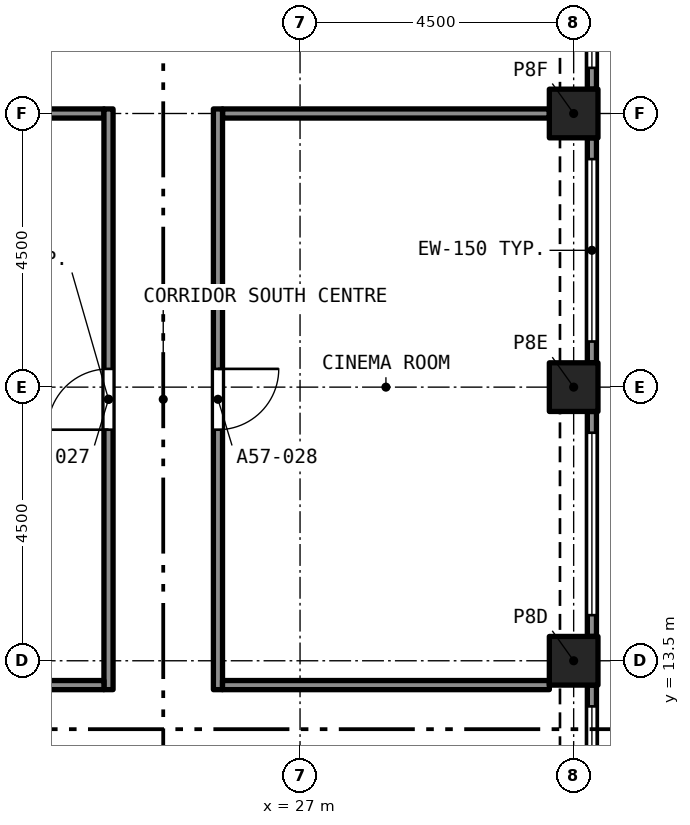
"""IFC4 building model, lengths in metres.
Left out: names, types, materials, properties, quantities, classifications, styles, units other than length and angle.
Written with IfcOpenShell. Run it as: python <this file> out.ifc"""

import sys

from ifc_helpers import new_model, si_unit, direction, frame, frame_2d, origin, origin_2d, place, context, subcontext, project, spatial, rectangle, extrude, element, fill, save


model = new_model("IFC4")
c1 = context("Model", 3, precision=1e-05, world=origin(), true_north=direction((0.0, 1.0)))
c2 = subcontext(c1, "Body", "Model", "MODEL_VIEW")
j1 = project(units=[si_unit("LENGTHUNIT", "METRE"), si_unit("PLANEANGLEUNIT", "RADIAN")], contexts=[c1])
p1 = place(None, origin())
s1 = spatial("IfcSite", under=j1, at=p1, CompositionType="ELEMENT")
p2 = place(p1, origin())
s2 = spatial("IfcBuilding", under=s1, at=p2, CompositionType="ELEMENT")
p3 = place(p2, frame((0.0, 0.0, 206.895)))
s3 = spatial("IfcBuildingStorey", under=s2, at=p3, CompositionType="ELEMENT", Elevation=206.895)
for number, where, z_axis, x_axis in (
    (1, (31.5, 13.5, 0.0), (0.0, 0.0, 1.0), (1.0, 0.0, 0.0)),
    (2, (31.5, 18.0, 0.0), (0.0, 0.0, 1.0), (1.0, 0.0, 0.0)),
    (3, (31.5, 22.5, 0.0), (0.0, 0.0, 1.0), (1.0, 0.0, 0.0)),
):
    element("IfcColumn", number, at=place(p3, frame(where, z_axis=z_axis, x_axis=x_axis)), inside=s3, PredefinedType="COLUMN", context=c2, shape_type="SweptSolid", body=[
        extrude(rectangle(XDim=0.8, YDim=0.8, at=origin_2d()), origin(), (0.0, 0.0, 1.0), 3.2),
    ])
p4 = place(p3, frame((31.8, 13.1, 0.0), z_axis=(0.0, 0.0, 1.0), x_axis=(0.0, -1.0, 0.0)))
e4 = element("IfcWall", 4, at=p4, inside=s3, PredefinedType="SOLIDWALL", context=c2, shape_type="SweptSolid", body=[
    extrude(rectangle(XDim=3.7, YDim=0.15, at=frame_2d((1.85, 0.0))), origin(), (0.0, 0.0, 1.0), 3.2),
])
p5 = place(p4, frame((0.35, 0.0, 0.45)))
e5 = element("IfcOpeningElement", 5, at=p5, cuts=e4, PredefinedType="OPENING", context=c2, shape_type="SweptSolid", body=[
    extrude(rectangle(XDim=3.0, YDim=1.95, at=frame_2d((1.5, 0.975))), frame((0.0, 0.085, 0.0), z_axis=(0.0, -1.0, 0.0), x_axis=(1.0, 0.0, 0.0)), (0.0, 0.0, 1.0), 0.17),
])
p6 = place(p3, frame((31.8, 17.6, 0.0), z_axis=(0.0, 0.0, 1.0), x_axis=(0.0, -1.0, 0.0)))
e6 = element("IfcWall", 6, at=p6, inside=s3, PredefinedType="SOLIDWALL", context=c2, shape_type="SweptSolid", body=[
    extrude(rectangle(XDim=3.7, YDim=0.15, at=frame_2d((1.85, 0.0))), origin(), (0.0, 0.0, 1.0), 3.2),
])
p7 = place(p6, frame((0.35, 0.0, 0.45)))
e7 = element("IfcOpeningElement", 7, at=p7, cuts=e6, PredefinedType="OPENING", context=c2, shape_type="SweptSolid", body=[
    extrude(rectangle(XDim=3.0, YDim=1.95, at=frame_2d((1.5, 0.975))), frame((0.0, 0.085, 0.0), z_axis=(0.0, -1.0, 0.0), x_axis=(1.0, 0.0, 0.0)), (0.0, 0.0, 1.0), 0.17),
])
p8 = place(p3, frame((31.8, 22.1, 0.0), z_axis=(0.0, 0.0, 1.0), x_axis=(0.0, -1.0, 0.0)))
e8 = element("IfcWall", 8, at=p8, inside=s3, PredefinedType="SOLIDWALL", context=c2, shape_type="SweptSolid", body=[
    extrude(rectangle(XDim=3.7, YDim=0.15, at=frame_2d((1.85, 0.0))), origin(), (0.0, 0.0, 1.0), 3.2),
])
p9 = place(p8, frame((0.35, 0.0, 0.45)))
e9 = element("IfcOpeningElement", 9, at=p9, cuts=e8, PredefinedType="OPENING", context=c2, shape_type="SweptSolid", body=[
    extrude(rectangle(XDim=3.0, YDim=1.95, at=frame_2d((1.5, 0.975))), frame((0.0, 0.085, 0.0), z_axis=(0.0, -1.0, 0.0), x_axis=(1.0, 0.0, 0.0)), (0.0, 0.0, 1.0), 0.17),
])
p10 = place(p3, frame((31.8, 26.6, 0.0), z_axis=(0.0, 0.0, 1.0), x_axis=(0.0, -1.0, 0.0)))
e10 = element("IfcWall", 10, at=p10, inside=s3, PredefinedType="SOLIDWALL", context=c2, shape_type="SweptSolid", body=[
    extrude(rectangle(XDim=3.7, YDim=0.15, at=frame_2d((1.85, 0.0))), origin(), (0.0, 0.0, 1.0), 3.2),
])
p11 = place(p10, frame((0.35, 0.0, 0.45)))
e11 = element("IfcOpeningElement", 11, at=p11, cuts=e10, PredefinedType="OPENING", context=c2, shape_type="SweptSolid", body=[
    extrude(rectangle(XDim=3.0, YDim=1.95, at=frame_2d((1.5, 0.975))), frame((0.0, 0.085, 0.0), z_axis=(0.0, -1.0, 0.0), x_axis=(1.0, 0.0, 0.0)), (0.0, 0.0, 1.0), 0.17),
])
for number, where, z_axis, x_axis in (
    (12, (18.4, 22.5, 0.0), (0.0, 0.0, 1.0), (1.0, 0.0, 0.0)),
    (13, (25.725, 22.5, 0.0), (0.0, 0.0, 1.0), (1.0, 0.0, 0.0)),
):
    element("IfcWall", number, at=place(p3, frame(where, z_axis=z_axis, x_axis=x_axis)), inside=s3, PredefinedType="PARTITIONING", context=c2, shape_type="SweptSolid", body=[
        extrude(rectangle(XDim=5.375, YDim=0.15, at=frame_2d((2.688, 0.0))), origin(), (0.0, 0.0, 1.0), 2.75),
    ])
p12 = place(p3, frame((23.85, 13.025, 0.0), z_axis=(0.0, 0.0, 1.0), x_axis=(0.0, 1.0, 0.0)))
e14 = element("IfcWall", 14, at=p12, inside=s3, PredefinedType="PARTITIONING", context=c2, shape_type="SweptSolid", body=[
    extrude(rectangle(XDim=9.55, YDim=0.15, at=frame_2d((4.775, 0.0))), origin(), (0.0, 0.0, 1.0), 2.75),
])
p13 = place(p12, frame((4.275, 0.0, 0.0)))
e15 = element("IfcOpeningElement", 15, at=p13, cuts=e14, PredefinedType="OPENING", context=c2, shape_type="SweptSolid", body=[
    extrude(rectangle(XDim=1.0, YDim=2.1, at=frame_2d((0.5, 1.05))), frame((0.0, 0.085, 0.0), z_axis=(0.0, -1.0, 0.0), x_axis=(1.0, 0.0, 0.0)), (0.0, 0.0, 1.0), 0.17),
])
p14 = place(p3, frame((25.65, 22.575, 0.0), z_axis=(0.0, 0.0, 1.0), x_axis=(0.0, -1.0, 0.0)))
e16 = element("IfcWall", 16, at=p14, inside=s3, PredefinedType="PARTITIONING", context=c2, shape_type="SweptSolid", body=[
    extrude(rectangle(XDim=9.55, YDim=0.15, at=frame_2d((4.775, 0.0))), origin(), (0.0, 0.0, 1.0), 2.75),
])
p15 = place(p14, frame((4.275, 0.0, 0.0)))
e17 = element("IfcOpeningElement", 17, at=p15, cuts=e16, PredefinedType="OPENING", context=c2, shape_type="SweptSolid", body=[
    extrude(rectangle(XDim=1.0, YDim=2.1, at=frame_2d((0.5, 1.05))), frame((0.0, 0.085, 0.0), z_axis=(0.0, -1.0, 0.0), x_axis=(1.0, 0.0, 0.0)), (0.0, 0.0, 1.0), 0.17),
])
for number, where, z_axis, x_axis in (
    (18, (18.4, 13.1, 0.0), (0.0, 0.0, 1.0), (1.0, 0.0, 0.0)),
    (19, (25.725, 13.1, 0.0), (0.0, 0.0, 1.0), (1.0, 0.0, 0.0)),
):
    element("IfcWall", number, at=place(p3, frame(where, z_axis=z_axis, x_axis=x_axis)), inside=s3, PredefinedType="PARTITIONING", context=c2, shape_type="SweptSolid", body=[
        extrude(rectangle(XDim=5.375, YDim=0.15, at=frame_2d((2.688, 0.0))), origin(), (0.0, 0.0, 1.0), 2.75),
    ])
p16 = place(p5, origin())
e20 = element("IfcWindow", 20, at=p16, inside=s3, PartitioningType="SINGLE_PANEL", PredefinedType="WINDOW", context=c2, shape_type="SweptSolid", body=[
    extrude(rectangle(XDim=3.0, YDim=1.95, at=frame_2d((1.5, 0.975))), frame((0.0, 0.03, 0.0), z_axis=(0.0, -1.0, 0.0), x_axis=(1.0, 0.0, 0.0)), (0.0, 0.0, 1.0), 0.06),
])
fill(e5, e20)
p17 = place(p7, origin())
e21 = element("IfcWindow", 21, at=p17, inside=s3, PartitioningType="SINGLE_PANEL", PredefinedType="WINDOW", context=c2, shape_type="SweptSolid", body=[
    extrude(rectangle(XDim=3.0, YDim=1.95, at=frame_2d((1.5, 0.975))), frame((0.0, 0.03, 0.0), z_axis=(0.0, -1.0, 0.0), x_axis=(1.0, 0.0, 0.0)), (0.0, 0.0, 1.0), 0.06),
])
fill(e7, e21)
p18 = place(p9, origin())
e22 = element("IfcWindow", 22, at=p18, inside=s3, PartitioningType="SINGLE_PANEL", PredefinedType="WINDOW", context=c2, shape_type="SweptSolid", body=[
    extrude(rectangle(XDim=3.0, YDim=1.95, at=frame_2d((1.5, 0.975))), frame((0.0, 0.03, 0.0), z_axis=(0.0, -1.0, 0.0), x_axis=(1.0, 0.0, 0.0)), (0.0, 0.0, 1.0), 0.06),
])
fill(e9, e22)
p19 = place(p11, origin())
e23 = element("IfcWindow", 23, at=p19, inside=s3, PartitioningType="SINGLE_PANEL", PredefinedType="WINDOW", context=c2, shape_type="SweptSolid", body=[
    extrude(rectangle(XDim=3.0, YDim=1.95, at=frame_2d((1.5, 0.975))), frame((0.0, 0.03, 0.0), z_axis=(0.0, -1.0, 0.0), x_axis=(1.0, 0.0, 0.0)), (0.0, 0.0, 1.0), 0.06),
])
fill(e11, e23)
p20 = place(p13, origin())
e24 = element("IfcDoor", 24, at=p20, inside=s3, OperationType="SINGLE_SWING_RIGHT", PredefinedType="DOOR", context=c2, shape_type="SweptSolid", body=[
    extrude(rectangle(XDim=1.0, YDim=2.1, at=frame_2d((0.5, 1.05))), frame((0.0, 0.025, 0.0), z_axis=(0.0, -1.0, 0.0), x_axis=(1.0, 0.0, 0.0)), (0.0, 0.0, 1.0), 0.05),
])
fill(e15, e24)
p21 = place(p15, origin())
e25 = element("IfcDoor", 25, at=p21, inside=s3, OperationType="SINGLE_SWING_LEFT", PredefinedType="DOOR", context=c2, shape_type="SweptSolid", body=[
    extrude(rectangle(XDim=1.0, YDim=2.1, at=frame_2d((0.5, 1.05))), frame((0.0, 0.025, 0.0), z_axis=(0.0, -1.0, 0.0), x_axis=(1.0, 0.0, 0.0)), (0.0, 0.0, 1.0), 0.05),
])
fill(e17, e25)
save(model, sys.argv[1])
